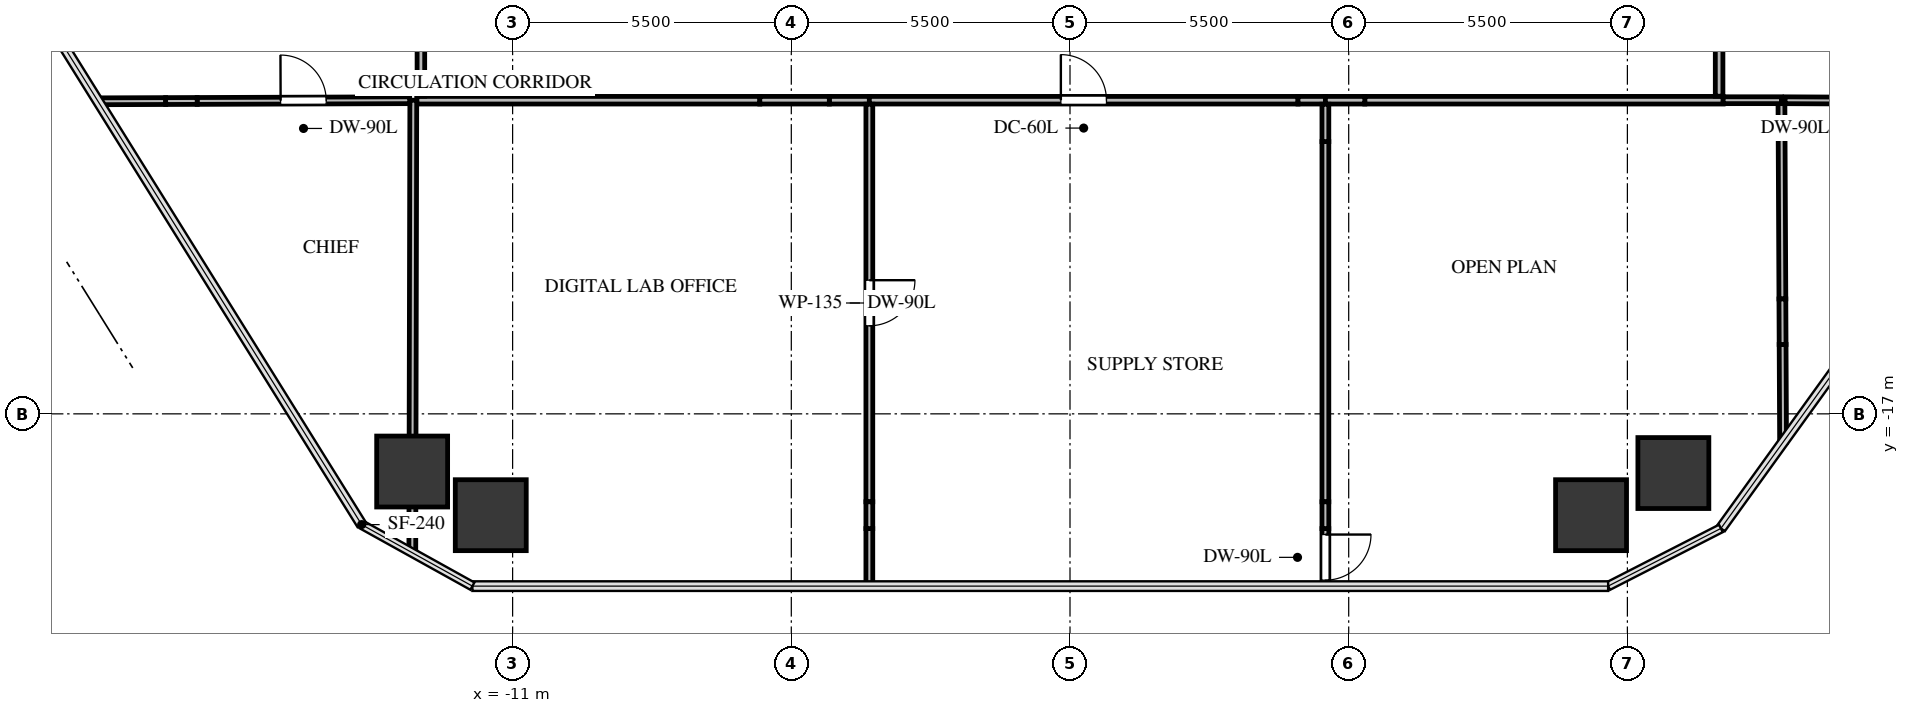
"""IFC4 building model, lengths in metres.
Left out: names, types, materials, properties, quantities, classifications, styles, units other than length and angle.
Written with IfcOpenShell. Run it as: python <this file> out.ifc"""

import sys

from ifc_helpers import new_model, si_unit, direction, frame, frame_2d, origin, origin_2d, place, context, subcontext, project, spatial, rectangle, extrude, source, transform, mapped, element, fill, save


model = new_model("IFC4")
c1 = context("Model", 3, precision=1e-05, world=origin(), true_north=direction((0.0, 1.0)))
c2 = subcontext(c1, "Body", "Model", "MODEL_VIEW")
j1 = project(units=[si_unit("LENGTHUNIT", "METRE"), si_unit("PLANEANGLEUNIT", "RADIAN")], contexts=[c1])
p1 = place(None, origin())
s1 = spatial("IfcSite", under=j1, at=p1, CompositionType="ELEMENT")
p2 = place(p1, origin())
s2 = spatial("IfcBuilding", under=s1, at=p2, CompositionType="ELEMENT")
p3 = place(p2, frame((0.0, 0.0, 81.3)))
s3 = spatial("IfcBuildingStorey", under=s2, at=p3, CompositionType="ELEMENT", Elevation=81.3)
m1 = source(origin(), c2, "Body", "SweptSolid", [
    extrude(rectangle(XDim=1.4, YDim=1.4, at=origin_2d()), origin(), (0.0, 0.0, 1.0), 3.0),
])
for number, where, z_axis, x_axis in (
    (1, (-12.983, -18.138, -0.24), (0.0, 0.0, 1.0), (1.0, 0.0, 0.0)),
    (2, (11.907, -18.168, -0.24), (0.0, 0.0, 1.0), (1.0, 0.0, 0.0)),
    (3, (10.283, -19.0, -0.24), (0.0, 0.0, 1.0), (1.0, 0.0, 0.0)),
    (4, (-11.431, -19.0, -0.24), (0.0, 0.0, 1.0), (1.0, 0.0, 0.0)),
):
    element("IfcColumn", number, at=place(p3, frame(where, z_axis=z_axis, x_axis=x_axis)), inside=s3, PredefinedType="COLUMN", context=c2, shape_type="MappedRepresentation", body=[
        mapped(m1, transform((0.0, 0.0, 0.0), x_axis=(1.0, 0.0, 0.0), y_axis=(0.0, 1.0, 0.0), z_axis=(0.0, 0.0, 1.0), scale=1.0)),
    ])
p4 = place(p3, frame((-12.89, -10.81, 0.0), z_axis=(0.0, 0.0, 1.0), x_axis=(1.0, 0.0, 0.0)))
e5 = element("IfcWall", 5, at=p4, inside=s3, PredefinedType="PARTITIONING", context=c2, shape_type="SweptSolid", body=[
    extrude(rectangle(XDim=6.768, YDim=0.15, at=frame_2d((3.384, 0.0))), origin(), (0.0, 0.0, 1.0), 1.83),
])
p5 = place(p3, frame((-4.75, -10.81, 0.0), z_axis=(0.0, 0.0, 1.0), x_axis=(1.0, 0.0, 0.0)))
e6 = element("IfcWall", 6, at=p5, inside=s3, PredefinedType="PARTITIONING", context=c2, shape_type="SweptSolid", body=[
    extrude(rectangle(XDim=0.79, YDim=0.15, at=frame_2d((0.395, 0.0))), origin(), (0.0, 0.0, 1.0), 2.745),
])
p6 = place(p3, frame((-6.122, -10.81, 0.0), z_axis=(0.0, 0.0, 1.0), x_axis=(1.0, 0.0, 0.0)))
e7 = element("IfcWall", 7, at=p6, inside=s3, PredefinedType="PARTITIONING", context=c2, shape_type="SweptSolid", body=[
    extrude(rectangle(XDim=1.372, YDim=0.15, at=frame_2d((0.686, 0.0))), origin(), (0.0, 0.0, 1.0), 1.83),
])
p7 = place(p3, frame((-3.96, -10.81, 0.0), z_axis=(0.0, 0.0, 1.0), x_axis=(1.0, 0.0, 0.0)))
e8 = element("IfcWall", 8, at=p7, inside=s3, PredefinedType="PARTITIONING", context=c2, shape_type="SweptSolid", body=[
    extrude(rectangle(XDim=8.459, YDim=0.15, at=frame_2d((4.229, 0.0))), origin(), (0.0, 0.0, 1.0), 2.745),
])
p8 = place(p7, frame((3.78, 0.0, 0.0)))
e9 = element("IfcOpeningElement", 9, at=p8, cuts=e8, PredefinedType="OPENING", context=c2, shape_type="SweptSolid", body=[
    extrude(rectangle(XDim=0.9, YDim=2.05, at=frame_2d((0.45, 1.025))), frame((0.0, 0.085, 0.0), z_axis=(0.0, -1.0, 0.0), x_axis=(1.0, 0.0, 0.0)), (0.0, 0.0, 1.0), 0.17),
])
p9 = place(p3, frame((4.499, -10.81, 0.0), z_axis=(0.0, 0.0, 1.0), x_axis=(1.0, 0.0, 0.0)))
e10 = element("IfcWall", 10, at=p9, inside=s3, PredefinedType="PARTITIONING", context=c2, shape_type="SweptSolid", body=[
    extrude(rectangle(XDim=0.541, YDim=0.15, at=frame_2d((0.271, 0.0))), origin(), (0.0, 0.0, 1.0), 1.83),
])
p10 = place(p3, frame((5.817, -10.81, 0.0), z_axis=(0.0, 0.0, 1.0), x_axis=(1.0, 0.0, 0.0)))
e11 = element("IfcWall", 11, at=p10, inside=s3, PredefinedType="PARTITIONING", context=c2, shape_type="SweptSolid", body=[
    extrude(rectangle(XDim=7.073, YDim=0.15, at=frame_2d((3.536, 0.0))), origin(), (0.0, 0.0, 1.0), 1.83),
])
p11 = place(p3, frame((5.04, -10.81, 0.0), z_axis=(0.0, 0.0, 1.0), x_axis=(1.0, 0.0, 0.0)))
e12 = element("IfcWall", 12, at=p11, inside=s3, PredefinedType="PARTITIONING", context=c2, shape_type="SweptSolid", body=[
    extrude(rectangle(XDim=0.777, YDim=0.15, at=frame_2d((0.389, 0.0))), origin(), (0.0, 0.0, 1.0), 1.83),
])
p12 = place(p3, frame((-12.81, 1.682, 0.0), z_axis=(0.0, 0.0, 1.0), x_axis=(0.0, -1.0, 0.0)))
e13 = element("IfcWall", 13, at=p12, inside=s3, PredefinedType="PARTITIONING", context=c2, shape_type="SweptSolid", body=[
    extrude(rectangle(XDim=12.413, YDim=0.15, at=frame_2d((6.207, 0.0))), origin(), (0.0, 0.0, 1.0), 2.745),
])
p13 = place(p12, frame((5.732, 0.0, 0.0)))
e14 = element("IfcOpeningElement", 14, at=p13, cuts=e13, PredefinedType="OPENING", context=c2, shape_type="SweptSolid", body=[
    extrude(rectangle(XDim=0.95, YDim=2.1, at=frame_2d((0.475, 1.05))), frame((0.0, 0.085, 0.0), z_axis=(0.0, -1.0, 0.0), x_axis=(1.0, 0.0, 0.0)), (0.0, 0.0, 1.0), 0.17),
])
p14 = place(p3, frame((12.81, -10.731, 0.0), z_axis=(0.0, 0.0, 1.0), x_axis=(0.0, 1.0, 0.0)))
e15 = element("IfcWall", 15, at=p14, inside=s3, PredefinedType="PARTITIONING", context=c2, shape_type="SweptSolid", body=[
    extrude(rectangle(XDim=2.291, YDim=0.15, at=frame_2d((1.146, 0.0))), origin(), (0.0, 0.0, 1.0), 2.745),
])
p15 = place(p3, frame((-12.96, -10.81, 0.0), z_axis=(0.0, 0.0, 1.0), x_axis=(-0.002177166658, -0.99999762997, 0.0)))
e16 = element("IfcWall", 16, at=p15, inside=s3, PredefinedType="PARTITIONING", context=c2, shape_type="SweptSolid", body=[
    extrude(rectangle(XDim=6.84, YDim=0.135, at=frame_2d((3.42, 0.0))), origin(), (0.0, 0.0, 1.0), 2.08),
])
p16 = place(p3, frame((-12.977, -18.479, 0.0), z_axis=(0.0, 0.0, 1.0), x_axis=(-0.002127243301, -0.999997737415, 0.0)))
e17 = element("IfcWall", 17, at=p16, inside=s3, PredefinedType="PARTITIONING", context=c2, shape_type="SweptSolid", body=[
    extrude(rectangle(XDim=1.262, YDim=0.135, at=frame_2d((0.631, 0.0))), origin(), (0.0, 0.0, 1.0), 2.745),
])
p17 = place(p3, frame((-12.975, -17.65, 0.0), z_axis=(0.0, 0.0, 1.0), x_axis=(-0.002356399938, -0.999997223686, 0.0)))
e18 = element("IfcWall", 18, at=p17, inside=s3, PredefinedType="PARTITIONING", context=c2, shape_type="SweptSolid", body=[
    extrude(rectangle(XDim=0.829, YDim=0.135, at=frame_2d((0.415, 0.0))), origin(), (0.0, 0.0, 1.0), 1.577),
])
p18 = place(p3, frame((-19.182, -10.831, 0.0), z_axis=(0.0, 0.0, 1.0), x_axis=(0.99999396086, 0.003475376853, 0.0)))
e19 = element("IfcWall", 19, at=p18, inside=s3, PredefinedType="PARTITIONING", context=c2, shape_type="SweptSolid", body=[
    extrude(rectangle(XDim=1.335, YDim=0.135, at=frame_2d((0.667, 0.0))), origin(), (0.0, 0.0, 1.0), 2.745),
])
p19 = place(p3, frame((-17.225, -10.824, 0.0), z_axis=(0.0, 0.0, 1.0), x_axis=(0.999994299971, 0.003376392444, 0.0)))
e20 = element("IfcWall", 20, at=p19, inside=s3, PredefinedType="PARTITIONING", context=c2, shape_type="SweptSolid", body=[
    extrude(rectangle(XDim=4.194, YDim=0.135, at=frame_2d((2.097, 0.0))), origin(), (0.0, 0.0, 1.0), 2.745),
])
p20 = place(p19, frame((1.647, 0.0, 0.0)))
e21 = element("IfcOpeningElement", 21, at=p20, cuts=e20, PredefinedType="OPENING", context=c2, shape_type="SweptSolid", body=[
    extrude(rectangle(XDim=0.9, YDim=2.05, at=frame_2d((0.45, 1.025))), frame((0.0, 0.078, 0.0), z_axis=(0.0, -1.0, 0.0), x_axis=(1.0, 0.0, 0.0)), (0.0, 0.0, 1.0), 0.155),
])
p21 = place(p3, frame((-17.847, -10.827, 0.0), z_axis=(0.0, 0.0, 1.0), x_axis=(0.999993761903, 0.00353216007, 0.0)))
e22 = element("IfcWall", 22, at=p21, inside=s3, PredefinedType="PARTITIONING", context=c2, shape_type="SweptSolid", body=[
    extrude(rectangle(XDim=0.622, YDim=0.135, at=frame_2d((0.311, 0.0))), origin(), (0.0, 0.0, 1.0), 2.08),
])
p22 = place(p3, frame((-3.96, -10.889, 0.0), z_axis=(0.0, 0.0, 1.0), x_axis=(0.0, -1.0, 0.0)))
e23 = element("IfcWall", 23, at=p22, inside=s3, PredefinedType="PARTITIONING", context=c2, shape_type="SweptSolid", body=[
    extrude(rectangle(XDim=7.847, YDim=0.135, at=frame_2d((3.923, 0.0))), origin(), (0.0, 0.0, 1.0), 2.745),
])
p23 = place(p22, frame((3.473, 0.0, 0.0)))
e24 = element("IfcOpeningElement", 24, at=p23, cuts=e23, PredefinedType="OPENING", context=c2, shape_type="SweptSolid", body=[
    extrude(rectangle(XDim=0.9, YDim=2.05, at=frame_2d((0.45, 1.025))), frame((0.0, 0.078, 0.0), z_axis=(0.0, -1.0, 0.0), x_axis=(1.0, 0.0, 0.0)), (0.0, 0.0, 1.0), 0.155),
])
p24 = place(p3, frame((-3.96, -19.264, 0.0), z_axis=(0.0, 0.0, 1.0), x_axis=(0.0, -1.0, 0.0)))
e25 = element("IfcWall", 25, at=p24, inside=s3, PredefinedType="PARTITIONING", context=c2, shape_type="SweptSolid", body=[
    extrude(rectangle(XDim=1.135, YDim=0.135, at=frame_2d((0.568, 0.0))), origin(), (0.0, 0.0, 1.0), 2.745),
])
p25 = place(p3, frame((-3.96, -18.736, 0.0), z_axis=(0.0, 0.0, 1.0), x_axis=(0.0, -1.0, 0.0)))
e26 = element("IfcWall", 26, at=p25, inside=s3, PredefinedType="PARTITIONING", context=c2, shape_type="SweptSolid", body=[
    extrude(rectangle(XDim=0.529, YDim=0.135, at=frame_2d((0.264, 0.0))), origin(), (0.0, 0.0, 1.0), 2.08),
])
p26 = place(p3, frame((5.04, -11.627, 0.0), z_axis=(0.0, 0.0, 1.0), x_axis=(0.0, -1.0, 0.0)))
e27 = element("IfcWall", 27, at=p26, inside=s3, PredefinedType="PARTITIONING", context=c2, shape_type="SweptSolid", body=[
    extrude(rectangle(XDim=7.109, YDim=0.135, at=frame_2d((3.554, 0.0))), origin(), (0.0, 0.0, 1.0), 1.83),
])
p27 = place(p3, frame((5.04, -19.264, 0.0), z_axis=(0.0, 0.0, 1.0), x_axis=(0.0, -1.0, 0.0)))
e28 = element("IfcWall", 28, at=p27, inside=s3, PredefinedType="PARTITIONING", context=c2, shape_type="SweptSolid", body=[
    extrude(rectangle(XDim=1.135, YDim=0.135, at=frame_2d((0.568, 0.0))), origin(), (0.0, 0.0, 1.0), 2.745),
])
p28 = place(p27, frame((0.118, 0.0, 0.0)))
e29 = element("IfcOpeningElement", 29, at=p28, cuts=e28, PredefinedType="OPENING", context=c2, shape_type="SweptSolid", body=[
    extrude(rectangle(XDim=0.9, YDim=2.05, at=frame_2d((0.45, 1.025))), frame((0.0, 0.078, 0.0), z_axis=(0.0, -1.0, 0.0), x_axis=(1.0, 0.0, 0.0)), (0.0, 0.0, 1.0), 0.155),
])
p29 = place(p3, frame((5.04, -10.889, 0.0), z_axis=(0.0, 0.0, 1.0), x_axis=(0.0, -1.0, 0.0)))
e30 = element("IfcWall", 30, at=p29, inside=s3, PredefinedType="PARTITIONING", context=c2, shape_type="SweptSolid", body=[
    extrude(rectangle(XDim=0.738, YDim=0.135, at=frame_2d((0.369, 0.0))), origin(), (0.0, 0.0, 1.0), 1.83),
])
p30 = place(p3, frame((5.04, -18.736, 0.0), z_axis=(0.0, 0.0, 1.0), x_axis=(0.0, -1.0, 0.0)))
e31 = element("IfcWall", 31, at=p30, inside=s3, PredefinedType="PARTITIONING", context=c2, shape_type="SweptSolid", body=[
    extrude(rectangle(XDim=0.529, YDim=0.135, at=frame_2d((0.264, 0.0))), origin(), (0.0, 0.0, 1.0), 2.08),
])
p31 = place(p3, frame((14.04, -10.81, 0.0), z_axis=(0.0, 0.0, 1.0), x_axis=(0.004792973268, -0.999988513638, 0.0)))
e32 = element("IfcWall", 32, at=p31, inside=s3, PredefinedType="PARTITIONING", context=c2, shape_type="SweptSolid", body=[
    extrude(rectangle(XDim=3.922, YDim=0.135, at=frame_2d((1.961, 0.0))), origin(), (0.0, 0.0, 1.0), 2.08),
])
p32 = place(p3, frame((14.063, -15.631, 0.0), z_axis=(0.0, 0.0, 1.0), x_axis=(0.004936648705, -0.999987814676, 0.0)))
e33 = element("IfcWall", 33, at=p32, inside=s3, PredefinedType="PARTITIONING", context=c2, shape_type="SweptSolid", body=[
    extrude(rectangle(XDim=1.929, YDim=0.135, at=frame_2d((0.964, 0.0))), origin(), (0.0, 0.0, 1.0), 2.08),
])
p33 = place(p3, frame((14.059, -14.732, 0.0), z_axis=(0.0, 0.0, 1.0), x_axis=(0.004618260991, -0.999989335776, 0.0)))
e34 = element("IfcWall", 34, at=p33, inside=s3, PredefinedType="PARTITIONING", context=c2, shape_type="SweptSolid", body=[
    extrude(rectangle(XDim=0.899, YDim=0.135, at=frame_2d((0.449, 0.0))), origin(), (0.0, 0.0, 1.0), 2.08),
])
p34 = place(p3, frame((12.89, -10.81, 0.0), z_axis=(0.0, 0.0, 1.0), x_axis=(1.0, 0.0, 0.0)))
e35 = element("IfcWall", 35, at=p34, inside=s3, PredefinedType="PARTITIONING", context=c2, shape_type="SweptSolid", body=[
    extrude(rectangle(XDim=1.15, YDim=0.135, at=frame_2d((0.575, 0.0))), origin(), (0.0, 0.0, 1.0), 2.745),
])
p35 = place(p3, frame((14.112, -10.811, 0.0), z_axis=(0.0, 0.0, 1.0), x_axis=(0.999989051327, -0.004679447265, 0.0)))
e36 = element("IfcWall", 36, at=p35, inside=s3, PredefinedType="PARTITIONING", context=c2, shape_type="SweptSolid", body=[
    extrude(rectangle(XDim=2.765, YDim=0.135, at=frame_2d((1.383, 0.0))), origin(), (0.0, 0.0, 1.0), 2.745),
])
p36 = place(p35, frame((0.933, 0.0, 0.0)))
e37 = element("IfcOpeningElement", 37, at=p36, cuts=e36, PredefinedType="OPENING", context=c2, shape_type="SweptSolid", body=[
    extrude(rectangle(XDim=0.9, YDim=2.05, at=frame_2d((0.45, 1.025))), frame((0.0, 0.078, 0.0), z_axis=(0.0, -1.0, 0.0), x_axis=(1.0, 0.0, 0.0)), (0.0, 0.0, 1.0), 0.155),
])
m2 = source(origin(), c2, "Body", "SweptSolid", [
    extrude(rectangle(XDim=0.9, YDim=2.05, at=frame_2d((0.45, 1.025))), frame((0.0, 0.025, 0.0), z_axis=(0.0, -1.0, 0.0), x_axis=(1.0, 0.0, 0.0)), (0.0, 0.0, 1.0), 0.05),
])
p37 = place(p8, origin())
e38 = element("IfcDoor", 38, at=p37, inside=s3, OperationType="SINGLE_SWING_LEFT", PredefinedType="DOOR", context=c2, shape_type="MappedRepresentation", body=[
    mapped(m2, transform((0.0, 0.0, 0.0), x_axis=(1.0, 0.0, 0.0), y_axis=(0.0, 1.0, 0.0), z_axis=(0.0, 0.0, 1.0), scale=1.0)),
])
fill(e9, e38)
m3 = source(origin(), c2, "Body", "SweptSolid", [
    extrude(rectangle(XDim=0.9, YDim=2.05, at=frame_2d((0.45, 1.025))), frame((0.0, 0.025, 0.0), z_axis=(0.0, -1.0, 0.0), x_axis=(1.0, 0.0, 0.0)), (0.0, 0.0, 1.0), 0.05),
])
p38 = place(p20, origin())
e39 = element("IfcDoor", 39, at=p38, inside=s3, OperationType="SINGLE_SWING_LEFT", PredefinedType="DOOR", context=c2, shape_type="MappedRepresentation", body=[
    mapped(m3, transform((0.0, 0.0, 0.0), x_axis=(1.0, 0.0, 0.0), y_axis=(0.0, 1.0, 0.0), z_axis=(0.0, 0.0, 1.0), scale=1.0)),
])
fill(e21, e39)
p39 = place(p23, origin())
e40 = element("IfcDoor", 40, at=p39, inside=s3, OperationType="SINGLE_SWING_LEFT", PredefinedType="DOOR", context=c2, shape_type="MappedRepresentation", body=[
    mapped(m3, transform((0.0, 0.0, 0.0), x_axis=(1.0, 0.0, 0.0), y_axis=(0.0, 1.0, 0.0), z_axis=(0.0, 0.0, 1.0), scale=1.0)),
])
fill(e24, e40)
p40 = place(p28, origin())
e41 = element("IfcDoor", 41, at=p40, inside=s3, OperationType="SINGLE_SWING_LEFT", PredefinedType="DOOR", context=c2, shape_type="MappedRepresentation", body=[
    mapped(m3, transform((0.0, 0.0, 0.0), x_axis=(1.0, 0.0, 0.0), y_axis=(0.0, 1.0, 0.0), z_axis=(0.0, 0.0, 1.0), scale=1.0)),
])
fill(e29, e41)
save(model, sys.argv[1])
